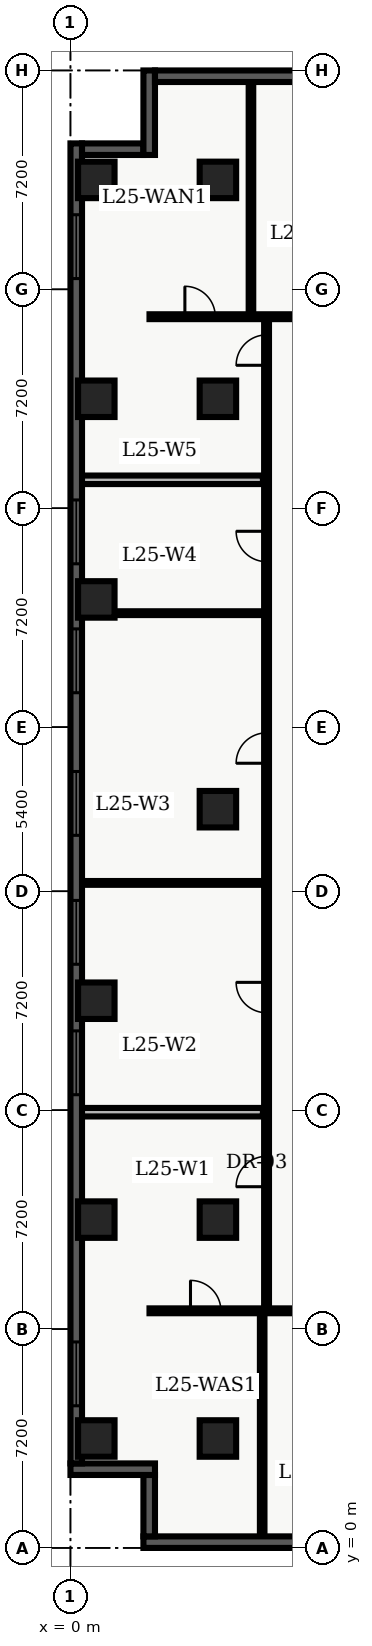
"""IFC4 building model, lengths in metres.
Left out: names, types, materials, properties, quantities, classifications, styles, units other than length and angle.
Written with IfcOpenShell. Run it as: python <this file> out.ifc"""

import sys

from ifc_helpers import new_model, entity, si_unit, converted_unit, direction, frame, origin_with_axes, origin_2d_with_axis, place, context, subcontext, project, spatial, polyline, rectangle, outline, extrude, element, fill, save


model = new_model("IFC4")
c1 = context("Model", 3, precision=1e-05, world=origin_with_axes(), true_north=direction((0.0, 1.0)))
c2 = subcontext(c1, "Body", "Model", "MODEL_VIEW")
j1 = project(units=[si_unit("LENGTHUNIT", "METRE"), converted_unit("PLANEANGLEUNIT", "DEGREE", entity("IfcPlaneAngleMeasure", 0.017), si_unit("PLANEANGLEUNIT", "RADIAN"), dimensions=[0, 0, 0, 0, 0, 0, 0])], contexts=[c1])
p1 = place(None, origin_with_axes())
s1 = spatial("IfcSite", under=j1, at=p1, CompositionType="ELEMENT")
p2 = place(p1, origin_with_axes())
s2 = spatial("IfcBuilding", under=s1, at=p2, CompositionType="ELEMENT")
p3 = place(p2, frame((0.0, 0.0, 104.7), z_axis=(0.0, 0.0, 1.0), x_axis=(1.0, 0.0, 0.0)))
s3 = spatial("IfcBuildingStorey", under=s2, at=p3, CompositionType="ELEMENT", Elevation=104.7)
for number, where, z_axis, x_axis in (
    (1, (4.85, 3.6, 0.0), (0.0, 0.0, 1.0), (1.0, 0.0, 0.0)),
    (2, (4.85, 10.8, 0.0), (0.0, 0.0, 1.0), (1.0, 0.0, 0.0)),
    (3, (4.85, 24.3, 0.0), (0.0, 0.0, 1.0), (1.0, 0.0, 0.0)),
    (4, (4.85, 37.8, 0.0), (0.0, 0.0, 1.0), (1.0, 0.0, 0.0)),
    (5, (4.85, 45.0, 0.0), (0.0, 0.0, 1.0), (1.0, 0.0, 0.0)),
    (6, (0.85, 3.6, 0.0), (0.0, 0.0, 1.0), (1.0, 0.0, 0.0)),
    (7, (0.85, 10.8, 0.0), (0.0, 0.0, 1.0), (1.0, 0.0, 0.0)),
    (8, (0.85, 18.0, 0.0), (0.0, 0.0, 1.0), (1.0, 0.0, 0.0)),
    (9, (0.85, 31.2, 0.0), (0.0, 0.0, 1.0), (1.0, 0.0, 0.0)),
    (10, (0.85, 37.8, 0.0), (0.0, 0.0, 1.0), (1.0, 0.0, 0.0)),
    (11, (0.85, 45.0, 0.0), (0.0, 0.0, 1.0), (1.0, 0.0, 0.0)),
):
    element("IfcColumn", number, at=place(p3, frame(where, z_axis=z_axis, x_axis=x_axis)), inside=s3, PredefinedType="COLUMN", context=c2, shape_type="SweptSolid", body=[
        extrude(rectangle(XDim=1.2, YDim=1.2, at=origin_2d_with_axis()), origin_with_axes(), (0.0, 0.0, 1.0), 3.9),
    ])
p4 = place(p3, frame((2.6, 7.8, 0.0), z_axis=(0.0, 0.0, 1.0), x_axis=(1.0, 0.0, 0.0)))
e12 = element("IfcWall", 12, at=p4, inside=s3, PredefinedType="PARTITIONING", context=c2, shape_type="SweptSolid", body=[
    extrude(outline(polyline([(0.0, -0.08), (18.55, -0.08), (18.55, 0.08), (0.0, 0.08), (0.0, -0.08)])), origin_with_axes(), (0.0, 0.0, 1.0), 2.7),
])
p5 = place(p4, frame((1.848, 0.0, 0.0), z_axis=(0.0, 0.0, 1.0), x_axis=(1.0, 0.0, 0.0)))
e13 = element("IfcOpeningElement", 13, at=p5, cuts=e12, PredefinedType="OPENING", context=c2, shape_type="SweptSolid", body=[
    extrude(rectangle(XDim=1.0, YDim=0.18, at=origin_2d_with_axis()), origin_with_axes(), (0.0, 0.0, 1.0), 2.15),
])
p6 = place(p4, frame((6.253, 0.0, 0.0), z_axis=(0.0, 0.0, 1.0), x_axis=(1.0, 0.0, 0.0)))
e14 = element("IfcOpeningElement", 14, at=p6, cuts=e12, PredefinedType="OPENING", context=c2, shape_type="SweptSolid", body=[
    extrude(rectangle(XDim=1.0, YDim=0.18, at=origin_2d_with_axis()), origin_with_axes(), (0.0, 0.0, 1.0), 2.15),
])
p7 = place(p4, frame((10.845, 0.0, 0.0), z_axis=(0.0, 0.0, 1.0), x_axis=(1.0, 0.0, 0.0)))
e15 = element("IfcOpeningElement", 15, at=p7, cuts=e12, PredefinedType="OPENING", context=c2, shape_type="SweptSolid", body=[
    extrude(rectangle(XDim=1.0, YDim=0.18, at=origin_2d_with_axis()), origin_with_axes(), (0.0, 0.0, 1.0), 2.15),
])
p8 = place(p4, frame((15.694, 0.0, 0.0), z_axis=(0.0, 0.0, 1.0), x_axis=(1.0, 0.0, 0.0)))
e16 = element("IfcOpeningElement", 16, at=p8, cuts=e12, PredefinedType="OPENING", context=c2, shape_type="SweptSolid", body=[
    extrude(rectangle(XDim=1.0, YDim=0.18, at=origin_2d_with_axis()), origin_with_axes(), (0.0, 0.0, 1.0), 2.15),
])
p9 = place(p3, frame((2.6, 40.5, 0.0), z_axis=(0.0, 0.0, 1.0), x_axis=(1.0, 0.0, 0.0)))
e17 = element("IfcWall", 17, at=p9, inside=s3, PredefinedType="PARTITIONING", context=c2, shape_type="SweptSolid", body=[
    extrude(outline(polyline([(0.0, -0.08), (18.65, -0.08), (18.65, 0.08), (0.0, 0.08), (0.0, -0.08)])), origin_with_axes(), (0.0, 0.0, 1.0), 2.7),
])
p10 = place(p9, frame((1.663, 0.0, 0.0), z_axis=(0.0, 0.0, 1.0), x_axis=(1.0, 0.0, 0.0)))
e18 = element("IfcOpeningElement", 18, at=p10, cuts=e17, PredefinedType="OPENING", context=c2, shape_type="SweptSolid", body=[
    extrude(rectangle(XDim=1.0, YDim=0.18, at=origin_2d_with_axis()), origin_with_axes(), (0.0, 0.0, 1.0), 2.15),
])
p11 = place(p9, frame((6.069, 0.0, 0.0), z_axis=(0.0, 0.0, 1.0), x_axis=(1.0, 0.0, 0.0)))
e19 = element("IfcOpeningElement", 19, at=p11, cuts=e17, PredefinedType="OPENING", context=c2, shape_type="SweptSolid", body=[
    extrude(rectangle(XDim=1.0, YDim=0.18, at=origin_2d_with_axis()), origin_with_axes(), (0.0, 0.0, 1.0), 2.15),
])
p12 = place(p9, frame((10.015, 0.0, 0.0), z_axis=(0.0, 0.0, 1.0), x_axis=(1.0, 0.0, 0.0)))
e20 = element("IfcOpeningElement", 20, at=p12, cuts=e17, PredefinedType="OPENING", context=c2, shape_type="SweptSolid", body=[
    extrude(rectangle(XDim=1.0, YDim=0.18, at=origin_2d_with_axis()), origin_with_axes(), (0.0, 0.0, 1.0), 2.15),
])
p13 = place(p9, frame((13.825, 0.0, 0.0), z_axis=(0.0, 0.0, 1.0), x_axis=(1.0, 0.0, 0.0)))
e21 = element("IfcOpeningElement", 21, at=p13, cuts=e17, PredefinedType="OPENING", context=c2, shape_type="SweptSolid", body=[
    extrude(rectangle(XDim=1.0, YDim=0.18, at=origin_2d_with_axis()), origin_with_axes(), (0.0, 0.0, 1.0), 2.15),
])
p14 = place(p3, frame((6.45, 7.8, 0.0), z_axis=(0.0, 0.0, 1.0), x_axis=(0.0, 1.0, 0.0)))
e22 = element("IfcWall", 22, at=p14, inside=s3, PredefinedType="PARTITIONING", context=c2, shape_type="SweptSolid", body=[
    extrude(outline(polyline([(0.0, -0.08), (32.7, -0.08), (32.7, 0.08), (0.0, 0.08), (0.0, -0.08)])), origin_with_axes(), (0.0, 0.0, 1.0), 2.7),
])
p15 = place(p14, frame((4.582, 0.0, 0.0), z_axis=(0.0, 0.0, 1.0), x_axis=(1.0, 0.0, 0.0)))
e23 = element("IfcOpeningElement", 23, at=p15, cuts=e22, PredefinedType="OPENING", context=c2, shape_type="SweptSolid", body=[
    extrude(rectangle(XDim=1.0, YDim=0.18, at=origin_2d_with_axis()), origin_with_axes(), (0.0, 0.0, 1.0), 2.15),
])
p16 = place(p14, frame((10.304, 0.0, 0.0), z_axis=(0.0, 0.0, 1.0), x_axis=(1.0, 0.0, 0.0)))
e24 = element("IfcOpeningElement", 24, at=p16, cuts=e22, PredefinedType="OPENING", context=c2, shape_type="SweptSolid", body=[
    extrude(rectangle(XDim=1.0, YDim=0.18, at=origin_2d_with_axis()), origin_with_axes(), (0.0, 0.0, 1.0), 2.15),
])
p17 = place(p14, frame((18.512, 0.0, 0.0), z_axis=(0.0, 0.0, 1.0), x_axis=(1.0, 0.0, 0.0)))
e25 = element("IfcOpeningElement", 25, at=p17, cuts=e22, PredefinedType="OPENING", context=c2, shape_type="SweptSolid", body=[
    extrude(rectangle(XDim=1.0, YDim=0.18, at=origin_2d_with_axis()), origin_with_axes(), (0.0, 0.0, 1.0), 2.15),
])
p18 = place(p14, frame((25.142, 0.0, 0.0), z_axis=(0.0, 0.0, 1.0), x_axis=(1.0, 0.0, 0.0)))
e26 = element("IfcOpeningElement", 26, at=p18, cuts=e22, PredefinedType="OPENING", context=c2, shape_type="SweptSolid", body=[
    extrude(rectangle(XDim=1.0, YDim=0.18, at=origin_2d_with_axis()), origin_with_axes(), (0.0, 0.0, 1.0), 2.15),
])
p19 = place(p14, frame((31.602, 0.0, 0.0), z_axis=(0.0, 0.0, 1.0), x_axis=(1.0, 0.0, 0.0)))
e27 = element("IfcOpeningElement", 27, at=p19, cuts=e22, PredefinedType="OPENING", context=c2, shape_type="SweptSolid", body=[
    extrude(rectangle(XDim=1.0, YDim=0.18, at=origin_2d_with_axis()), origin_with_axes(), (0.0, 0.0, 1.0), 2.15),
])
p20 = place(p3, frame((0.375, 14.333, 0.0), z_axis=(0.0, 0.0, 1.0), x_axis=(1.0, 0.0, 0.0)))
e28 = element("IfcWall", 28, at=p20, inside=s3, PredefinedType="PARTITIONING", context=c2, shape_type="SweptSolid", body=[
    extrude(outline(polyline([(0.0, -0.14), (5.955, -0.14), (5.955, 0.14), (0.0, 0.14), (0.0, -0.14)])), origin_with_axes(), (0.0, 0.0, 1.0), 2.7),
])
for number, where, z_axis, x_axis in (
    (29, (0.375, 21.875, 0.0), (0.0, 0.0, 1.0), (1.0, 0.0, 0.0)),
    (30, (0.375, 30.748, 0.0), (0.0, 0.0, 1.0), (1.0, 0.0, 0.0)),
):
    element("IfcWall", number, at=place(p3, frame(where, z_axis=z_axis, x_axis=x_axis)), inside=s3, PredefinedType="PARTITIONING", context=c2, shape_type="SweptSolid", body=[
        extrude(outline(polyline([(0.0, -0.062), (5.955, -0.062), (5.955, 0.062), (0.0, 0.062), (0.0, -0.062)])), origin_with_axes(), (0.0, 0.0, 1.0), 2.7),
    ])
p21 = place(p3, frame((0.375, 35.135, 0.0), z_axis=(0.0, 0.0, 1.0), x_axis=(1.0, 0.0, 0.0)))
e31 = element("IfcWall", 31, at=p21, inside=s3, PredefinedType="PARTITIONING", context=c2, shape_type="SweptSolid", body=[
    extrude(outline(polyline([(0.0, -0.14), (5.955, -0.14), (5.955, 0.14), (0.0, 0.14), (0.0, -0.14)])), origin_with_axes(), (0.0, 0.0, 1.0), 2.7),
])
p22 = place(p3, frame((6.306, 0.36, 0.0), z_axis=(0.0, 0.0, 1.0), x_axis=(0.0, 1.0, 0.0)))
e32 = element("IfcWall", 32, at=p22, inside=s3, PredefinedType="PARTITIONING", context=c2, shape_type="SweptSolid", body=[
    extrude(outline(polyline([(0.0, -0.075), (7.34, -0.075), (7.34, 0.075), (0.0, 0.075), (0.0, -0.075)])), origin_with_axes(), (0.0, 0.0, 1.0), 2.7),
])
p23 = place(p3, frame((5.937, 40.6, 0.0), z_axis=(0.0, 0.0, 1.0), x_axis=(0.0, 1.0, 0.0)))
e33 = element("IfcWall", 33, at=p23, inside=s3, PredefinedType="PARTITIONING", context=c2, shape_type="SweptSolid", body=[
    extrude(outline(polyline([(0.0, -0.075), (7.64, -0.075), (7.64, 0.075), (0.0, 0.075), (0.0, -0.075)])), origin_with_axes(), (0.0, 0.0, 1.0), 2.7),
])
p24 = place(p3, frame((21.22, 0.19, 0.0), z_axis=(0.0, 0.0, 1.0), x_axis=(-1.0, 0.0, 0.0)))
e34 = element("IfcWall", 34, at=p24, inside=s3, PredefinedType="SOLIDWALL", context=c2, shape_type="SweptSolid", body=[
    extrude(outline(polyline([(0.0, -0.19), (18.82, -0.19), (18.82, 0.19), (0.0, 0.19), (0.0, -0.19)])), origin_with_axes(), (0.0, 0.0, 1.0), 3.66),
])
p25 = place(p24, frame((3.537, 0.0, 0.45), z_axis=(0.0, 0.0, 1.0), x_axis=(1.0, 0.0, 0.0)))
e35 = element("IfcOpeningElement", 35, at=p25, cuts=e34, PredefinedType="OPENING", context=c2, shape_type="SweptSolid", body=[
    extrude(rectangle(XDim=2.1, YDim=0.4, at=origin_2d_with_axis()), origin_with_axes(), (0.0, 0.0, 1.0), 2.2),
])
p26 = place(p3, frame((2.59, 0.38, 0.0), z_axis=(0.0, 0.0, 1.0), x_axis=(0.0, 1.0, 0.0)))
e36 = element("IfcWall", 36, at=p26, inside=s3, PredefinedType="SOLIDWALL", context=c2, shape_type="SweptSolid", body=[
    extrude(outline(polyline([(0.0, -0.19), (2.02, -0.19), (2.02, 0.19), (0.0, 0.19), (0.0, -0.19)])), origin_with_axes(), (0.0, 0.0, 1.0), 3.66),
])
p27 = place(p3, frame((2.78, 2.59, 0.0), z_axis=(0.0, 0.0, 1.0), x_axis=(-1.0, 0.0, 0.0)))
e37 = element("IfcWall", 37, at=p27, inside=s3, PredefinedType="SOLIDWALL", context=c2, shape_type="SweptSolid", body=[
    extrude(outline(polyline([(0.0, -0.19), (2.78, -0.19), (2.78, 0.19), (0.0, 0.19), (0.0, -0.19)])), origin_with_axes(), (0.0, 0.0, 1.0), 3.66),
])
p28 = place(p3, frame((0.19, 2.78, 0.0), z_axis=(0.0, 0.0, 1.0), x_axis=(0.0, 1.0, 0.0)))
e38 = element("IfcWall", 38, at=p28, inside=s3, PredefinedType="SOLIDWALL", context=c2, shape_type="SweptSolid", body=[
    extrude(outline(polyline([(0.0, -0.19), (43.42, -0.19), (43.42, 0.19), (0.0, 0.19), (0.0, -0.19)])), origin_with_axes(), (0.0, 0.0, 1.0), 3.66),
])
p29 = place(p28, frame((2.946, 0.0, 0.45), z_axis=(0.0, 0.0, 1.0), x_axis=(1.0, 0.0, 0.0)))
e39 = element("IfcOpeningElement", 39, at=p29, cuts=e38, PredefinedType="OPENING", context=c2, shape_type="SweptSolid", body=[
    extrude(rectangle(XDim=2.1, YDim=0.4, at=origin_2d_with_axis()), origin_with_axes(), (0.0, 0.0, 1.0), 2.2),
])
p30 = place(p28, frame((13.178, 0.0, 0.45), z_axis=(0.0, 0.0, 1.0), x_axis=(1.0, 0.0, 0.0)))
e40 = element("IfcOpeningElement", 40, at=p30, cuts=e38, PredefinedType="OPENING", context=c2, shape_type="SweptSolid", body=[
    extrude(rectangle(XDim=2.1, YDim=0.4, at=origin_2d_with_axis()), origin_with_axes(), (0.0, 0.0, 1.0), 2.2),
])
p31 = place(p28, frame((17.469, 0.0, 0.45), z_axis=(0.0, 0.0, 1.0), x_axis=(1.0, 0.0, 0.0)))
e41 = element("IfcOpeningElement", 41, at=p31, cuts=e38, PredefinedType="OPENING", context=c2, shape_type="SweptSolid", body=[
    extrude(rectangle(XDim=2.1, YDim=0.4, at=origin_2d_with_axis()), origin_with_axes(), (0.0, 0.0, 1.0), 2.2),
])
p32 = place(p28, frame((21.71, 0.0, 0.45), z_axis=(0.0, 0.0, 1.0), x_axis=(1.0, 0.0, 0.0)))
e42 = element("IfcOpeningElement", 42, at=p32, cuts=e38, PredefinedType="OPENING", context=c2, shape_type="SweptSolid", body=[
    extrude(rectangle(XDim=2.1, YDim=0.4, at=origin_2d_with_axis()), origin_with_axes(), (0.0, 0.0, 1.0), 2.2),
])
p33 = place(p28, frame((26.401, 0.0, 0.45), z_axis=(0.0, 0.0, 1.0), x_axis=(1.0, 0.0, 0.0)))
e43 = element("IfcOpeningElement", 43, at=p33, cuts=e38, PredefinedType="OPENING", context=c2, shape_type="SweptSolid", body=[
    extrude(rectangle(XDim=2.1, YDim=0.4, at=origin_2d_with_axis()), origin_with_axes(), (0.0, 0.0, 1.0), 2.2),
])
p34 = place(p28, frame((30.642, 0.0, 0.45), z_axis=(0.0, 0.0, 1.0), x_axis=(1.0, 0.0, 0.0)))
e44 = element("IfcOpeningElement", 44, at=p34, cuts=e38, PredefinedType="OPENING", context=c2, shape_type="SweptSolid", body=[
    extrude(rectangle(XDim=2.1, YDim=0.4, at=origin_2d_with_axis()), origin_with_axes(), (0.0, 0.0, 1.0), 2.2),
])
p35 = place(p28, frame((40.024, 0.0, 0.45), z_axis=(0.0, 0.0, 1.0), x_axis=(1.0, 0.0, 0.0)))
e45 = element("IfcOpeningElement", 45, at=p35, cuts=e38, PredefinedType="OPENING", context=c2, shape_type="SweptSolid", body=[
    extrude(rectangle(XDim=2.1, YDim=0.4, at=origin_2d_with_axis()), origin_with_axes(), (0.0, 0.0, 1.0), 2.2),
])
p36 = place(p3, frame((0.38, 46.01, 0.0), z_axis=(0.0, 0.0, 1.0), x_axis=(1.0, 0.0, 0.0)))
e46 = element("IfcWall", 46, at=p36, inside=s3, PredefinedType="SOLIDWALL", context=c2, shape_type="SweptSolid", body=[
    extrude(outline(polyline([(0.0, -0.19), (2.02, -0.19), (2.02, 0.19), (0.0, 0.19), (0.0, -0.19)])), origin_with_axes(), (0.0, 0.0, 1.0), 3.66),
])
p37 = place(p3, frame((2.59, 45.82, 0.0), z_axis=(0.0, 0.0, 1.0), x_axis=(0.0, 1.0, 0.0)))
e47 = element("IfcWall", 47, at=p37, inside=s3, PredefinedType="SOLIDWALL", context=c2, shape_type="SweptSolid", body=[
    extrude(outline(polyline([(0.0, -0.19), (2.78, -0.19), (2.78, 0.19), (0.0, 0.19), (0.0, -0.19)])), origin_with_axes(), (0.0, 0.0, 1.0), 3.66),
])
p38 = place(p3, frame((2.78, 48.41, 0.0), z_axis=(0.0, 0.0, 1.0), x_axis=(1.0, 0.0, 0.0)))
e48 = element("IfcWall", 48, at=p38, inside=s3, PredefinedType="SOLIDWALL", context=c2, shape_type="SweptSolid", body=[
    extrude(outline(polyline([(0.0, -0.19), (16.42, -0.19), (16.42, 0.19), (0.0, 0.19), (0.0, -0.19)])), origin_with_axes(), (0.0, 0.0, 1.0), 3.66),
])
p39 = place(p38, frame((13.283, 0.0, 0.45), z_axis=(0.0, 0.0, 1.0), x_axis=(1.0, 0.0, 0.0)))
e49 = element("IfcOpeningElement", 49, at=p39, cuts=e48, PredefinedType="OPENING", context=c2, shape_type="SweptSolid", body=[
    extrude(rectangle(XDim=2.1, YDim=0.4, at=origin_2d_with_axis()), origin_with_axes(), (0.0, 0.0, 1.0), 2.2),
])
p40 = place(p14, frame((4.582, 0.0, 0.0), z_axis=(0.0, 0.0, 1.0), x_axis=(1.0, 0.0, 0.0)))
e50 = element("IfcDoor", 50, at=p40, inside=s3, OperationType="SINGLE_SWING_LEFT", PredefinedType="DOOR", context=c2, shape_type="SweptSolid", body=[
    extrude(rectangle(XDim=1.0, YDim=0.09, at=origin_2d_with_axis()), origin_with_axes(), (0.0, 0.0, 1.0), 2.15),
])
fill(e23, e50)
p41 = place(p14, frame((10.304, 0.0, 0.0), z_axis=(0.0, 0.0, 1.0), x_axis=(1.0, 0.0, 0.0)))
e51 = element("IfcDoor", 51, at=p41, inside=s3, OperationType="SINGLE_SWING_RIGHT", PredefinedType="DOOR", context=c2, shape_type="SweptSolid", body=[
    extrude(rectangle(XDim=1.0, YDim=0.09, at=origin_2d_with_axis()), origin_with_axes(), (0.0, 0.0, 1.0), 2.15),
])
fill(e24, e51)
p42 = place(p14, frame((18.512, 0.0, 0.0), z_axis=(0.0, 0.0, 1.0), x_axis=(1.0, 0.0, 0.0)))
e52 = element("IfcDoor", 52, at=p42, inside=s3, OperationType="SINGLE_SWING_LEFT", PredefinedType="DOOR", context=c2, shape_type="SweptSolid", body=[
    extrude(rectangle(XDim=1.0, YDim=0.09, at=origin_2d_with_axis()), origin_with_axes(), (0.0, 0.0, 1.0), 2.15),
])
fill(e25, e52)
p43 = place(p14, frame((25.142, 0.0, 0.0), z_axis=(0.0, 0.0, 1.0), x_axis=(1.0, 0.0, 0.0)))
e53 = element("IfcDoor", 53, at=p43, inside=s3, OperationType="SINGLE_SWING_RIGHT", PredefinedType="DOOR", context=c2, shape_type="SweptSolid", body=[
    extrude(rectangle(XDim=1.0, YDim=0.09, at=origin_2d_with_axis()), origin_with_axes(), (0.0, 0.0, 1.0), 2.15),
])
fill(e26, e53)
p44 = place(p14, frame((31.602, 0.0, 0.0), z_axis=(0.0, 0.0, 1.0), x_axis=(1.0, 0.0, 0.0)))
e54 = element("IfcDoor", 54, at=p44, inside=s3, OperationType="SINGLE_SWING_LEFT", PredefinedType="DOOR", context=c2, shape_type="SweptSolid", body=[
    extrude(rectangle(XDim=1.0, YDim=0.09, at=origin_2d_with_axis()), origin_with_axes(), (0.0, 0.0, 1.0), 2.15),
])
fill(e27, e54)
p45 = place(p4, frame((1.848, 0.0, 0.0), z_axis=(0.0, 0.0, 1.0), x_axis=(1.0, 0.0, 0.0)))
e55 = element("IfcDoor", 55, at=p45, inside=s3, OperationType="SINGLE_SWING_LEFT", PredefinedType="DOOR", context=c2, shape_type="SweptSolid", body=[
    extrude(rectangle(XDim=1.0, YDim=0.09, at=origin_2d_with_axis()), origin_with_axes(), (0.0, 0.0, 1.0), 2.15),
])
fill(e13, e55)
p46 = place(p9, frame((1.663, 0.0, 0.0), z_axis=(0.0, 0.0, 1.0), x_axis=(1.0, 0.0, 0.0)))
e56 = element("IfcDoor", 56, at=p46, inside=s3, OperationType="SINGLE_SWING_LEFT", PredefinedType="DOOR", context=c2, shape_type="SweptSolid", body=[
    extrude(rectangle(XDim=1.0, YDim=0.09, at=origin_2d_with_axis()), origin_with_axes(), (0.0, 0.0, 1.0), 2.15),
])
fill(e18, e56)
p47 = place(p28, frame((2.946, 0.0, 0.45), z_axis=(0.0, 0.0, 1.0), x_axis=(1.0, 0.0, 0.0)))
e57 = element("IfcWindow", 57, at=p47, inside=s3, PredefinedType="WINDOW", context=c2, shape_type="SweptSolid", body=[
    extrude(rectangle(XDim=2.1, YDim=0.09, at=origin_2d_with_axis()), origin_with_axes(), (0.0, 0.0, 1.0), 2.2),
])
fill(e39, e57)
p48 = place(p28, frame((13.178, 0.0, 0.45), z_axis=(0.0, 0.0, 1.0), x_axis=(1.0, 0.0, 0.0)))
e58 = element("IfcWindow", 58, at=p48, inside=s3, PredefinedType="WINDOW", context=c2, shape_type="SweptSolid", body=[
    extrude(rectangle(XDim=2.1, YDim=0.09, at=origin_2d_with_axis()), origin_with_axes(), (0.0, 0.0, 1.0), 2.2),
])
fill(e40, e58)
p49 = place(p28, frame((17.469, 0.0, 0.45), z_axis=(0.0, 0.0, 1.0), x_axis=(1.0, 0.0, 0.0)))
e59 = element("IfcWindow", 59, at=p49, inside=s3, PredefinedType="WINDOW", context=c2, shape_type="SweptSolid", body=[
    extrude(rectangle(XDim=2.1, YDim=0.09, at=origin_2d_with_axis()), origin_with_axes(), (0.0, 0.0, 1.0), 2.2),
])
fill(e41, e59)
p50 = place(p28, frame((21.71, 0.0, 0.45), z_axis=(0.0, 0.0, 1.0), x_axis=(1.0, 0.0, 0.0)))
e60 = element("IfcWindow", 60, at=p50, inside=s3, PredefinedType="WINDOW", context=c2, shape_type="SweptSolid", body=[
    extrude(rectangle(XDim=2.1, YDim=0.09, at=origin_2d_with_axis()), origin_with_axes(), (0.0, 0.0, 1.0), 2.2),
])
fill(e42, e60)
p51 = place(p28, frame((26.401, 0.0, 0.45), z_axis=(0.0, 0.0, 1.0), x_axis=(1.0, 0.0, 0.0)))
e61 = element("IfcWindow", 61, at=p51, inside=s3, PredefinedType="WINDOW", context=c2, shape_type="SweptSolid", body=[
    extrude(rectangle(XDim=2.1, YDim=0.09, at=origin_2d_with_axis()), origin_with_axes(), (0.0, 0.0, 1.0), 2.2),
])
fill(e43, e61)
p52 = place(p28, frame((30.642, 0.0, 0.45), z_axis=(0.0, 0.0, 1.0), x_axis=(1.0, 0.0, 0.0)))
e62 = element("IfcWindow", 62, at=p52, inside=s3, PredefinedType="WINDOW", context=c2, shape_type="SweptSolid", body=[
    extrude(rectangle(XDim=2.1, YDim=0.09, at=origin_2d_with_axis()), origin_with_axes(), (0.0, 0.0, 1.0), 2.2),
])
fill(e44, e62)
p53 = place(p28, frame((40.024, 0.0, 0.45), z_axis=(0.0, 0.0, 1.0), x_axis=(1.0, 0.0, 0.0)))
e63 = element("IfcWindow", 63, at=p53, inside=s3, PredefinedType="WINDOW", context=c2, shape_type="SweptSolid", body=[
    extrude(rectangle(XDim=2.1, YDim=0.09, at=origin_2d_with_axis()), origin_with_axes(), (0.0, 0.0, 1.0), 2.2),
])
fill(e45, e63)
save(model, sys.argv[1])
